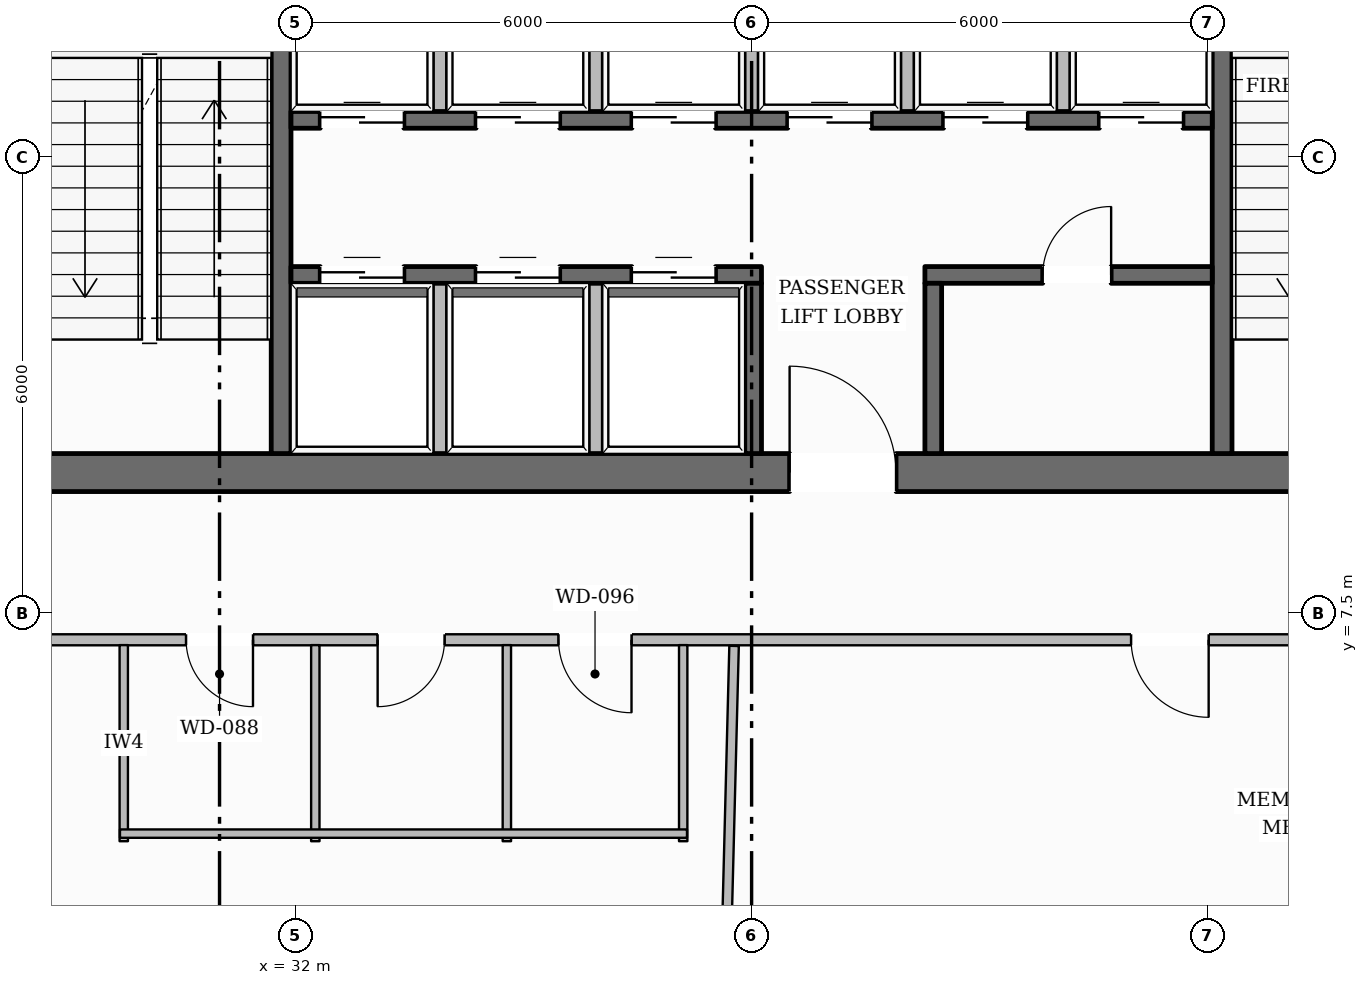
"""IFC4 building model, lengths in metres.
Left out: names, types, materials, properties, quantities, classifications, styles, units other than length and angle.
Written with IfcOpenShell. Run it as: python <this file> out.ifc"""

import sys

from ifc_helpers import new_model, si_unit, direction, frame, frame_2d, origin, place, context, subcontext, project, spatial, rectangle, extrude, element, fill, save


model = new_model("IFC4")
c1 = context("Model", 3, precision=1e-05, world=origin(), true_north=direction((0.0, 1.0)))
c2 = subcontext(c1, "Body", "Model", "MODEL_VIEW")
j1 = project(units=[si_unit("LENGTHUNIT", "METRE"), si_unit("PLANEANGLEUNIT", "RADIAN")], contexts=[c1])
p1 = place(None, origin())
s1 = spatial("IfcSite", under=j1, at=p1, CompositionType="ELEMENT")
p2 = place(p1, origin())
s2 = spatial("IfcBuilding", under=s1, at=p2, CompositionType="ELEMENT")
p3 = place(p2, frame((0.0, 0.0, 80.5)))
s3 = spatial("IfcBuildingStorey", under=s2, at=p3, CompositionType="ELEMENT", Elevation=80.5)
p4 = place(p3, frame((27.98, 9.35, 0.0), z_axis=(0.0, 0.0, 1.0), x_axis=(1.0, 0.0, 0.0)))
e1 = element("IfcWall", 1, at=p4, inside=s3, PredefinedType="SOLIDWALL", context=c2, shape_type="SweptSolid", body=[
    extrude(rectangle(XDim=20.04, YDim=0.5, at=frame_2d((10.02, 0.0))), origin(), (0.0, 0.0, 1.0), 4.75),
])
p5 = place(p4, frame((10.52, 0.0, 0.0)))
e2 = element("IfcOpeningElement", 2, at=p5, cuts=e1, PredefinedType="OPENING", context=c2, shape_type="SweptSolid", body=[
    extrude(rectangle(XDim=1.4, YDim=2.2, at=frame_2d((0.7, 1.1))), frame((0.0, 0.26, 0.0), z_axis=(0.0, -1.0, 0.0), x_axis=(1.0, 0.0, 0.0)), (0.0, 0.0, 1.0), 0.52),
])
p6 = place(p3, frame((31.81, 9.6, 0.0), z_axis=(0.0, 0.0, 1.0), x_axis=(0.0, 1.0, 0.0)))
e3 = element("IfcWall", 3, at=p6, inside=s3, PredefinedType="SHEAR", context=c2, shape_type="SweptSolid", body=[
    extrude(rectangle(XDim=13.0, YDim=0.26, at=frame_2d((6.5, 0.0))), origin(), (0.0, 0.0, 1.0), 4.75),
])
p7 = place(p6, frame((10.925, 0.0, 0.0)))
e4 = element("IfcOpeningElement", 4, at=p7, cuts=e3, PredefinedType="OPENING", context=c2, shape_type="SweptSolid", body=[
    extrude(rectangle(XDim=1.25, YDim=2.25, at=frame_2d((0.625, 1.125))), frame((0.0, 0.14, 0.0), z_axis=(0.0, -1.0, 0.0), x_axis=(1.0, 0.0, 0.0)), (0.0, 0.0, 1.0), 0.28),
])
p8 = place(p3, frame((44.19, 9.6, 0.0), z_axis=(0.0, 0.0, 1.0), x_axis=(0.0, 1.0, 0.0)))
e5 = element("IfcWall", 5, at=p8, inside=s3, PredefinedType="SHEAR", context=c2, shape_type="SweptSolid", body=[
    extrude(rectangle(XDim=13.0, YDim=0.26, at=frame_2d((6.5, 0.0))), origin(), (0.0, 0.0, 1.0), 4.75),
])
p9 = place(p8, frame((10.925, 0.0, 0.0)))
e6 = element("IfcOpeningElement", 6, at=p9, cuts=e5, PredefinedType="OPENING", context=c2, shape_type="SweptSolid", body=[
    extrude(rectangle(XDim=1.25, YDim=2.25, at=frame_2d((0.625, 1.125))), frame((0.0, 0.14, 0.0), z_axis=(0.0, -1.0, 0.0), x_axis=(1.0, 0.0, 0.0)), (0.0, 0.0, 1.0), 0.28),
])
p10 = place(p3, frame((31.94, 13.99, 0.0), z_axis=(0.0, 0.0, 1.0), x_axis=(1.0, 0.0, 0.0)))
e7 = element("IfcWall", 7, at=p10, inside=s3, PredefinedType="SOLIDWALL", context=c2, shape_type="SweptSolid", body=[
    extrude(rectangle(XDim=12.12, YDim=0.22, at=frame_2d((6.06, 0.0))), origin(), (0.0, 0.0, 1.0), 4.75),
])
p11 = place(p10, frame((0.385, 0.0, 0.0)))
e8 = element("IfcOpeningElement", 8, at=p11, cuts=e7, PredefinedType="OPENING", context=c2, shape_type="SweptSolid", body=[
    extrude(rectangle(XDim=1.1, YDim=2.2, at=frame_2d((0.55, 1.1))), frame((0.0, 0.12, 0.0), z_axis=(0.0, -1.0, 0.0), x_axis=(1.0, 0.0, 0.0)), (0.0, 0.0, 1.0), 0.24),
])
p12 = place(p10, frame((2.435, 0.0, 0.0)))
e9 = element("IfcOpeningElement", 9, at=p12, cuts=e7, PredefinedType="OPENING", context=c2, shape_type="SweptSolid", body=[
    extrude(rectangle(XDim=1.1, YDim=2.2, at=frame_2d((0.55, 1.1))), frame((0.0, 0.12, 0.0), z_axis=(0.0, -1.0, 0.0), x_axis=(1.0, 0.0, 0.0)), (0.0, 0.0, 1.0), 0.24),
])
p13 = place(p10, frame((4.485, 0.0, 0.0)))
e10 = element("IfcOpeningElement", 10, at=p13, cuts=e7, PredefinedType="OPENING", context=c2, shape_type="SweptSolid", body=[
    extrude(rectangle(XDim=1.1, YDim=2.2, at=frame_2d((0.55, 1.1))), frame((0.0, 0.12, 0.0), z_axis=(0.0, -1.0, 0.0), x_axis=(1.0, 0.0, 0.0)), (0.0, 0.0, 1.0), 0.24),
])
p14 = place(p10, frame((6.535, 0.0, 0.0)))
e11 = element("IfcOpeningElement", 11, at=p14, cuts=e7, PredefinedType="OPENING", context=c2, shape_type="SweptSolid", body=[
    extrude(rectangle(XDim=1.1, YDim=2.2, at=frame_2d((0.55, 1.1))), frame((0.0, 0.12, 0.0), z_axis=(0.0, -1.0, 0.0), x_axis=(1.0, 0.0, 0.0)), (0.0, 0.0, 1.0), 0.24),
])
p15 = place(p10, frame((8.585, 0.0, 0.0)))
e12 = element("IfcOpeningElement", 12, at=p15, cuts=e7, PredefinedType="OPENING", context=c2, shape_type="SweptSolid", body=[
    extrude(rectangle(XDim=1.1, YDim=2.2, at=frame_2d((0.55, 1.1))), frame((0.0, 0.12, 0.0), z_axis=(0.0, -1.0, 0.0), x_axis=(1.0, 0.0, 0.0)), (0.0, 0.0, 1.0), 0.24),
])
p16 = place(p10, frame((10.635, 0.0, 0.0)))
e13 = element("IfcOpeningElement", 13, at=p16, cuts=e7, PredefinedType="OPENING", context=c2, shape_type="SweptSolid", body=[
    extrude(rectangle(XDim=1.1, YDim=2.2, at=frame_2d((0.55, 1.1))), frame((0.0, 0.12, 0.0), z_axis=(0.0, -1.0, 0.0), x_axis=(1.0, 0.0, 0.0)), (0.0, 0.0, 1.0), 0.24),
])
p17 = place(p3, frame((31.94, 11.95, 0.0), z_axis=(0.0, 0.0, 1.0), x_axis=(1.0, 0.0, 0.0)))
e14 = element("IfcWall", 14, at=p17, inside=s3, PredefinedType="SOLIDWALL", context=c2, shape_type="SweptSolid", body=[
    extrude(rectangle(XDim=6.19, YDim=0.22, at=frame_2d((3.095, 0.0))), origin(), (0.0, 0.0, 1.0), 4.75),
])
p18 = place(p17, frame((0.385, 0.0, 0.0)))
e15 = element("IfcOpeningElement", 15, at=p18, cuts=e14, PredefinedType="OPENING", context=c2, shape_type="SweptSolid", body=[
    extrude(rectangle(XDim=1.1, YDim=2.2, at=frame_2d((0.55, 1.1))), frame((0.0, 0.12, 0.0), z_axis=(0.0, -1.0, 0.0), x_axis=(1.0, 0.0, 0.0)), (0.0, 0.0, 1.0), 0.24),
])
p19 = place(p17, frame((2.435, 0.0, 0.0)))
e16 = element("IfcOpeningElement", 16, at=p19, cuts=e14, PredefinedType="OPENING", context=c2, shape_type="SweptSolid", body=[
    extrude(rectangle(XDim=1.1, YDim=2.2, at=frame_2d((0.55, 1.1))), frame((0.0, 0.12, 0.0), z_axis=(0.0, -1.0, 0.0), x_axis=(1.0, 0.0, 0.0)), (0.0, 0.0, 1.0), 0.24),
])
p20 = place(p17, frame((4.485, 0.0, 0.0)))
e17 = element("IfcOpeningElement", 17, at=p20, cuts=e14, PredefinedType="OPENING", context=c2, shape_type="SweptSolid", body=[
    extrude(rectangle(XDim=1.1, YDim=2.2, at=frame_2d((0.55, 1.1))), frame((0.0, 0.12, 0.0), z_axis=(0.0, -1.0, 0.0), x_axis=(1.0, 0.0, 0.0)), (0.0, 0.0, 1.0), 0.24),
])
p21 = place(p3, frame((40.28, 11.95, 0.0), z_axis=(0.0, 0.0, 1.0), x_axis=(1.0, 0.0, 0.0)))
e18 = element("IfcWall", 18, at=p21, inside=s3, PredefinedType="SOLIDWALL", context=c2, shape_type="SweptSolid", body=[
    extrude(rectangle(XDim=3.78, YDim=0.22, at=frame_2d((1.89, 0.0))), origin(), (0.0, 0.0, 1.0), 4.75),
])
p22 = place(p21, frame((1.55, 0.0, 0.0)))
e19 = element("IfcOpeningElement", 19, at=p22, cuts=e18, PredefinedType="OPENING", context=c2, shape_type="SweptSolid", body=[
    extrude(rectangle(XDim=0.9, YDim=2.1, at=frame_2d((0.45, 1.05))), frame((0.0, 0.12, 0.0), z_axis=(0.0, -1.0, 0.0), x_axis=(1.0, 0.0, 0.0)), (0.0, 0.0, 1.0), 0.24),
])
for number, where, z_axis, x_axis in (
    (20, (38.02, 9.6, 0.0), (0.0, 0.0, 1.0), (0.0, 1.0, 0.0)),
    (21, (40.39, 9.6, 0.0), (0.0, 0.0, 1.0), (0.0, 1.0, 0.0)),
):
    element("IfcWall", number, at=place(p3, frame(where, z_axis=z_axis, x_axis=x_axis)), inside=s3, PredefinedType="SOLIDWALL", context=c2, shape_type="SweptSolid", body=[
        extrude(rectangle(XDim=2.24, YDim=0.22, at=frame_2d((1.12, 0.0))), origin(), (0.0, 0.0, 1.0), 4.75),
    ])
p23 = place(p3, frame((13.724, 13.51, 0.0), z_axis=(0.0, 0.0, 1.0), x_axis=(0.500779221595, 0.865575052331, 0.0)))
e22 = element("IfcWall", 22, at=p23, inside=s3, PredefinedType="STANDARD", context=c2, shape_type="SweptSolid", body=[
    extrude(rectangle(XDim=35.421, YDim=0.38, at=frame_2d((17.71, 0.0))), origin(), (0.0, 0.0, 1.0), 4.209),
])
p24 = place(p23, frame((31.073, 0.0, 0.65)))
e23 = element("IfcOpeningElement", 23, at=p24, cuts=e22, PredefinedType="OPENING", context=c2, shape_type="SweptSolid", body=[
    extrude(rectangle(XDim=2.0, YDim=2.25, at=frame_2d((1.0, 1.125))), frame((0.0, 0.2, 0.0), z_axis=(0.0, -1.0, 0.0), x_axis=(1.0, 0.0, 0.0)), (0.0, 0.0, 1.0), 0.4),
])
p25 = place(p23, frame((2.348, 0.0, 0.65)))
e24 = element("IfcOpeningElement", 24, at=p25, cuts=e22, PredefinedType="OPENING", context=c2, shape_type="SweptSolid", body=[
    extrude(rectangle(XDim=2.0, YDim=2.25, at=frame_2d((1.0, 1.125))), frame((0.0, 0.2, 0.0), z_axis=(0.0, -1.0, 0.0), x_axis=(1.0, 0.0, 0.0)), (0.0, 0.0, 1.0), 0.4),
])
p26 = place(p3, frame((44.389, 44.257, 0.0), z_axis=(0.0, 0.0, 1.0), x_axis=(0.495210354805, -0.868773102999, 0.0)))
e25 = element("IfcWall", 25, at=p26, inside=s3, PredefinedType="STANDARD", context=c2, shape_type="SweptSolid", body=[
    extrude(rectangle(XDim=35.035, YDim=0.38, at=frame_2d((17.518, 0.0))), origin(), (0.0, 0.0, 1.0), 4.209),
])
p27 = place(p26, frame((30.72, 0.0, 0.65)))
e26 = element("IfcOpeningElement", 26, at=p27, cuts=e25, PredefinedType="OPENING", context=c2, shape_type="SweptSolid", body=[
    extrude(rectangle(XDim=2.0, YDim=2.25, at=frame_2d((1.0, 1.125))), frame((0.0, 0.2, 0.0), z_axis=(0.0, -1.0, 0.0), x_axis=(1.0, 0.0, 0.0)), (0.0, 0.0, 1.0), 0.4),
])
p28 = place(p26, frame((2.321, 0.0, 0.65)))
e27 = element("IfcOpeningElement", 27, at=p28, cuts=e25, PredefinedType="OPENING", context=c2, shape_type="SweptSolid", body=[
    extrude(rectangle(XDim=2.0, YDim=2.25, at=frame_2d((1.0, 1.125))), frame((0.0, 0.2, 0.0), z_axis=(0.0, -1.0, 0.0), x_axis=(1.0, 0.0, 0.0)), (0.0, 0.0, 1.0), 0.4),
])
for number, where, z_axis, x_axis in (
    (28, (33.9, 9.55, 0.0), (0.0, 0.0, 1.0), (0.0, 1.0, 0.0)),
    (29, (35.95, 9.55, 0.0), (0.0, 0.0, 1.0), (0.0, 1.0, 0.0)),
):
    element("IfcWall", number, at=place(p3, frame(where, z_axis=z_axis, x_axis=x_axis)), inside=s3, PredefinedType="PARTITIONING", context=c2, shape_type="SweptSolid", body=[
        extrude(rectangle(XDim=2.29, YDim=0.165, at=frame_2d((1.145, 0.0))), origin(), (0.0, 0.0, 1.0), 4.75),
    ])
for number, where, z_axis, x_axis in (
    (30, (33.9, 14.1, 0.0), (0.0, 0.0, 1.0), (0.0, 1.0, 0.0)),
    (31, (35.95, 14.1, 0.0), (0.0, 0.0, 1.0), (0.0, 1.0, 0.0)),
    (32, (38.0, 14.1, 0.0), (0.0, 0.0, 1.0), (0.0, 1.0, 0.0)),
    (33, (40.05, 14.1, 0.0), (0.0, 0.0, 1.0), (0.0, 1.0, 0.0)),
    (34, (42.1, 14.1, 0.0), (0.0, 0.0, 1.0), (0.0, 1.0, 0.0)),
):
    element("IfcWall", number, at=place(p3, frame(where, z_axis=z_axis, x_axis=x_axis)), inside=s3, PredefinedType="PARTITIONING", context=c2, shape_type="SweptSolid", body=[
        extrude(rectangle(XDim=2.24, YDim=0.165, at=frame_2d((1.12, 0.0))), origin(), (0.0, 0.0, 1.0), 4.75),
    ])
p29 = place(p3, frame((49.87, 7.15, 0.0), z_axis=(0.0, 0.0, 1.0), x_axis=(-1.0, 0.0, 0.0)))
e35 = element("IfcWall", 35, at=p29, inside=s3, PredefinedType="PARTITIONING", context=c2, shape_type="SweptSolid", body=[
    extrude(rectangle(XDim=23.74, YDim=0.145, at=frame_2d((11.87, 0.0))), origin(), (0.0, 0.0, 1.0), 4.75),
])
p30 = place(p29, frame((18.43, 0.0, 0.0)))
e36 = element("IfcOpeningElement", 36, at=p30, cuts=e35, PredefinedType="OPENING", context=c2, shape_type="SweptSolid", body=[
    extrude(rectangle(XDim=0.88, YDim=2.1, at=frame_2d((0.44, 1.05))), frame((0.0, 0.083, 0.0), z_axis=(0.0, -1.0, 0.0), x_axis=(1.0, 0.0, 0.0)), (0.0, 0.0, 1.0), 0.165),
])
p31 = place(p29, frame((15.91, 0.0, 0.0)))
e37 = element("IfcOpeningElement", 37, at=p31, cuts=e35, PredefinedType="OPENING", context=c2, shape_type="SweptSolid", body=[
    extrude(rectangle(XDim=0.88, YDim=2.1, at=frame_2d((0.44, 1.05))), frame((0.0, 0.083, 0.0), z_axis=(0.0, -1.0, 0.0), x_axis=(1.0, 0.0, 0.0)), (0.0, 0.0, 1.0), 0.165),
])
p32 = place(p29, frame((13.45, 0.0, 0.0)))
e38 = element("IfcOpeningElement", 38, at=p32, cuts=e35, PredefinedType="OPENING", context=c2, shape_type="SweptSolid", body=[
    extrude(rectangle(XDim=0.96, YDim=2.1, at=frame_2d((0.48, 1.05))), frame((0.0, 0.083, 0.0), z_axis=(0.0, -1.0, 0.0), x_axis=(1.0, 0.0, 0.0)), (0.0, 0.0, 1.0), 0.165),
])
p33 = place(p29, frame((5.857, 0.0, 0.0)))
e39 = element("IfcOpeningElement", 39, at=p33, cuts=e35, PredefinedType="OPENING", context=c2, shape_type="SweptSolid", body=[
    extrude(rectangle(XDim=1.02, YDim=2.15, at=frame_2d((0.51, 1.075))), frame((0.0, 0.083, 0.0), z_axis=(0.0, -1.0, 0.0), x_axis=(1.0, 0.0, 0.0)), (0.0, 0.0, 1.0), 0.165),
])
for number, where, z_axis, x_axis in (
    (40, (29.74, 4.5, 0.0), (0.0, 0.0, 1.0), (0.0, 1.0, 0.0)),
    (41, (32.26, 4.5, 0.0), (0.0, 0.0, 1.0), (0.0, 1.0, 0.0)),
    (42, (34.78, 4.5, 0.0), (0.0, 0.0, 1.0), (0.0, 1.0, 0.0)),
    (43, (37.1, 4.5, 0.0), (0.0, 0.0, 1.0), (0.0, 1.0, 0.0)),
):
    element("IfcWall", number, at=place(p3, frame(where, z_axis=z_axis, x_axis=x_axis)), inside=s3, PredefinedType="PLUMBINGWALL", context=c2, shape_type="SweptSolid", body=[
        extrude(rectangle(XDim=2.58, YDim=0.11, at=frame_2d((1.29, 0.0))), origin(), (0.0, 0.0, 1.0), 4.75),
    ])
p34 = place(p3, frame((29.69, 4.6, 0.0), z_axis=(0.0, 0.0, 1.0), x_axis=(1.0, 0.0, 0.0)))
e44 = element("IfcWall", 44, at=p34, inside=s3, PredefinedType="PLUMBINGWALL", context=c2, shape_type="SweptSolid", body=[
    extrude(rectangle(XDim=7.46, YDim=0.11, at=frame_2d((3.73, 0.0))), origin(), (0.0, 0.0, 1.0), 4.438),
])
p35 = place(p3, frame((37.769, 7.07, 0.0), z_axis=(0.0, 0.0, 1.0), x_axis=(-0.025533139841, -0.999673976239, 0.0)))
e45 = element("IfcWall", 45, at=p35, inside=s3, PredefinedType="PARTITIONING", context=c2, shape_type="SweptSolid", body=[
    extrude(rectangle(XDim=4.025, YDim=0.125, at=frame_2d((2.013, 0.0))), origin(), (0.0, 0.0, 1.0), 4.291),
])
p36 = place(p5, origin())
e46 = element("IfcDoor", 46, at=p36, inside=s3, OperationType="SINGLE_SWING_LEFT", PredefinedType="DOOR", context=c2, shape_type="SweptSolid", body=[
    extrude(rectangle(XDim=1.4, YDim=2.2, at=frame_2d((0.7, 1.1))), frame((0.0, 0.025, 0.0), z_axis=(0.0, -1.0, 0.0), x_axis=(1.0, 0.0, 0.0)), (0.0, 0.0, 1.0), 0.05),
])
fill(e2, e46)
p37 = place(p18, origin())
e47 = element("IfcDoor", 47, at=p37, inside=s3, OperationType="DOUBLE_DOOR_SLIDING", PredefinedType="DOOR", context=c2, shape_type="SweptSolid", body=[
    extrude(rectangle(XDim=1.1, YDim=2.2, at=frame_2d((0.55, 1.1))), frame((0.0, 0.025, 0.0), z_axis=(0.0, -1.0, 0.0), x_axis=(1.0, 0.0, 0.0)), (0.0, 0.0, 1.0), 0.05),
])
fill(e15, e47)
p38 = place(p19, origin())
e48 = element("IfcDoor", 48, at=p38, inside=s3, OperationType="DOUBLE_DOOR_SLIDING", PredefinedType="DOOR", context=c2, shape_type="SweptSolid", body=[
    extrude(rectangle(XDim=1.1, YDim=2.2, at=frame_2d((0.55, 1.1))), frame((0.0, 0.025, 0.0), z_axis=(0.0, -1.0, 0.0), x_axis=(1.0, 0.0, 0.0)), (0.0, 0.0, 1.0), 0.05),
])
fill(e16, e48)
p39 = place(p20, origin())
e49 = element("IfcDoor", 49, at=p39, inside=s3, OperationType="DOUBLE_DOOR_SLIDING", PredefinedType="DOOR", context=c2, shape_type="SweptSolid", body=[
    extrude(rectangle(XDim=1.1, YDim=2.2, at=frame_2d((0.55, 1.1))), frame((0.0, 0.025, 0.0), z_axis=(0.0, -1.0, 0.0), x_axis=(1.0, 0.0, 0.0)), (0.0, 0.0, 1.0), 0.05),
])
fill(e17, e49)
p40 = place(p11, origin())
e50 = element("IfcDoor", 50, at=p40, inside=s3, OperationType="DOUBLE_DOOR_SLIDING", PredefinedType="DOOR", context=c2, shape_type="SweptSolid", body=[
    extrude(rectangle(XDim=1.1, YDim=2.2, at=frame_2d((0.55, 1.1))), frame((0.0, 0.025, 0.0), z_axis=(0.0, -1.0, 0.0), x_axis=(1.0, 0.0, 0.0)), (0.0, 0.0, 1.0), 0.05),
])
fill(e8, e50)
p41 = place(p12, origin())
e51 = element("IfcDoor", 51, at=p41, inside=s3, OperationType="DOUBLE_DOOR_SLIDING", PredefinedType="DOOR", context=c2, shape_type="SweptSolid", body=[
    extrude(rectangle(XDim=1.1, YDim=2.2, at=frame_2d((0.55, 1.1))), frame((0.0, 0.025, 0.0), z_axis=(0.0, -1.0, 0.0), x_axis=(1.0, 0.0, 0.0)), (0.0, 0.0, 1.0), 0.05),
])
fill(e9, e51)
p42 = place(p13, origin())
e52 = element("IfcDoor", 52, at=p42, inside=s3, OperationType="DOUBLE_DOOR_SLIDING", PredefinedType="DOOR", context=c2, shape_type="SweptSolid", body=[
    extrude(rectangle(XDim=1.1, YDim=2.2, at=frame_2d((0.55, 1.1))), frame((0.0, 0.025, 0.0), z_axis=(0.0, -1.0, 0.0), x_axis=(1.0, 0.0, 0.0)), (0.0, 0.0, 1.0), 0.05),
])
fill(e10, e52)
p43 = place(p14, origin())
e53 = element("IfcDoor", 53, at=p43, inside=s3, OperationType="DOUBLE_DOOR_SLIDING", PredefinedType="DOOR", context=c2, shape_type="SweptSolid", body=[
    extrude(rectangle(XDim=1.1, YDim=2.2, at=frame_2d((0.55, 1.1))), frame((0.0, 0.025, 0.0), z_axis=(0.0, -1.0, 0.0), x_axis=(1.0, 0.0, 0.0)), (0.0, 0.0, 1.0), 0.05),
])
fill(e11, e53)
p44 = place(p15, origin())
e54 = element("IfcDoor", 54, at=p44, inside=s3, OperationType="DOUBLE_DOOR_SLIDING", PredefinedType="DOOR", context=c2, shape_type="SweptSolid", body=[
    extrude(rectangle(XDim=1.1, YDim=2.2, at=frame_2d((0.55, 1.1))), frame((0.0, 0.025, 0.0), z_axis=(0.0, -1.0, 0.0), x_axis=(1.0, 0.0, 0.0)), (0.0, 0.0, 1.0), 0.05),
])
fill(e12, e54)
p45 = place(p16, origin())
e55 = element("IfcDoor", 55, at=p45, inside=s3, OperationType="DOUBLE_DOOR_SLIDING", PredefinedType="DOOR", context=c2, shape_type="SweptSolid", body=[
    extrude(rectangle(XDim=1.1, YDim=2.2, at=frame_2d((0.55, 1.1))), frame((0.0, 0.025, 0.0), z_axis=(0.0, -1.0, 0.0), x_axis=(1.0, 0.0, 0.0)), (0.0, 0.0, 1.0), 0.05),
])
fill(e13, e55)
p46 = place(p22, origin())
e56 = element("IfcDoor", 56, at=p46, inside=s3, OperationType="SINGLE_SWING_RIGHT", PredefinedType="DOOR", context=c2, shape_type="SweptSolid", body=[
    extrude(rectangle(XDim=0.9, YDim=2.1, at=frame_2d((0.45, 1.05))), frame((0.0, 0.025, 0.0), z_axis=(0.0, -1.0, 0.0), x_axis=(1.0, 0.0, 0.0)), (0.0, 0.0, 1.0), 0.05),
])
fill(e19, e56)
p47 = place(p30, origin())
e57 = element("IfcDoor", 57, at=p47, inside=s3, OperationType="SINGLE_SWING_LEFT", PredefinedType="DOOR", context=c2, shape_type="SweptSolid", body=[
    extrude(rectangle(XDim=0.88, YDim=2.1, at=frame_2d((0.44, 1.05))), frame((0.0, 0.025, 0.0), z_axis=(0.0, -1.0, 0.0), x_axis=(1.0, 0.0, 0.0)), (0.0, 0.0, 1.0), 0.05),
])
fill(e36, e57)
p48 = place(p31, origin())
e58 = element("IfcDoor", 58, at=p48, inside=s3, OperationType="SINGLE_SWING_RIGHT", PredefinedType="DOOR", context=c2, shape_type="SweptSolid", body=[
    extrude(rectangle(XDim=0.88, YDim=2.1, at=frame_2d((0.44, 1.05))), frame((0.0, 0.025, 0.0), z_axis=(0.0, -1.0, 0.0), x_axis=(1.0, 0.0, 0.0)), (0.0, 0.0, 1.0), 0.05),
])
fill(e37, e58)
p49 = place(p32, origin())
e59 = element("IfcDoor", 59, at=p49, inside=s3, OperationType="SINGLE_SWING_LEFT", PredefinedType="DOOR", context=c2, shape_type="SweptSolid", body=[
    extrude(rectangle(XDim=0.96, YDim=2.1, at=frame_2d((0.48, 1.05))), frame((0.0, 0.025, 0.0), z_axis=(0.0, -1.0, 0.0), x_axis=(1.0, 0.0, 0.0)), (0.0, 0.0, 1.0), 0.05),
])
fill(e38, e59)
p50 = place(p33, origin())
e60 = element("IfcDoor", 60, at=p50, inside=s3, OperationType="SINGLE_SWING_LEFT", PredefinedType="DOOR", context=c2, shape_type="SweptSolid", body=[
    extrude(rectangle(XDim=1.02, YDim=2.15, at=frame_2d((0.51, 1.075))), frame((0.0, 0.025, 0.0), z_axis=(0.0, -1.0, 0.0), x_axis=(1.0, 0.0, 0.0)), (0.0, 0.0, 1.0), 0.05),
])
fill(e39, e60)
save(model, sys.argv[1])
